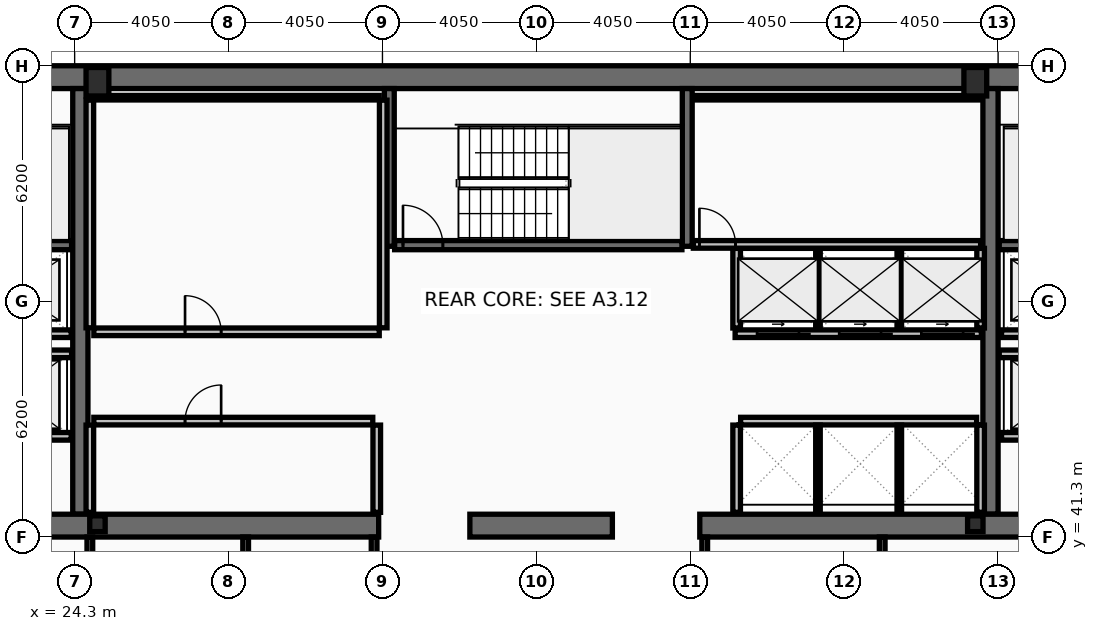
"""IFC4 building model, lengths in metres.
Left out: names, types, materials, properties, quantities, classifications, styles, units other than length and angle.
Written with IfcOpenShell. Run it as: python <this file> out.ifc"""

import sys

from ifc_helpers import new_model, si_unit, direction, frame, frame_2d, origin, origin_2d, place, context, subcontext, project, spatial, rectangle, hollow_rectangle, i_section, extrude, element, fill, save


model = new_model("IFC4")
c1 = context("Model", 3, precision=1e-05, world=origin(), true_north=direction((0.0, 1.0)))
c2 = subcontext(c1, "Body", "Model", "MODEL_VIEW")
j1 = project(units=[si_unit("LENGTHUNIT", "METRE"), si_unit("PLANEANGLEUNIT", "RADIAN")], contexts=[c1])
p1 = place(None, origin())
s1 = spatial("IfcSite", under=j1, at=p1, CompositionType="ELEMENT")
p2 = place(p1, origin())
s2 = spatial("IfcBuilding", under=s1, at=p2, CompositionType="ELEMENT")
p3 = place(p2, frame((0.0, 0.0, 199.4)))
s3 = spatial("IfcBuildingStorey", under=s2, at=p3, CompositionType="ELEMENT", Elevation=199.4)
p4 = place(p3, frame((16.2, 53.4, 0.0), z_axis=(0.0, 0.0, 1.0), x_axis=(1.0, 0.0, 0.0)))
e1 = element("IfcWall", 1, at=p4, inside=s3, PredefinedType="SHEAR", context=c2, shape_type="SweptSolid", body=[
    extrude(rectangle(XDim=40.5, YDim=0.6, at=frame_2d((20.25, 0.0))), origin(), (0.0, 0.0, 1.0), 3.44),
])
for number, where, z_axis, x_axis in (
    (2, (24.45, 41.9, 0.0), (0.0, 0.0, 1.0), (0.0, 1.0, 0.0)),
    (3, (48.4, 41.9, 0.0), (0.0, 0.0, 1.0), (0.0, 1.0, 0.0)),
):
    element("IfcWall", number, at=place(p3, frame(where, z_axis=z_axis, x_axis=x_axis)), inside=s3, PredefinedType="SHEAR", context=c2, shape_type="SweptSolid", body=[
        extrude(rectangle(XDim=11.2, YDim=0.4, at=frame_2d((5.6, 0.0))), origin(), (0.0, 0.0, 1.0), 3.44),
    ])
p5 = place(p3, frame((32.3, 41.6, 0.0), z_axis=(0.0, 0.0, 1.0), x_axis=(-1.0, 0.0, 0.0)))
e4 = element("IfcWall", 4, at=p5, inside=s3, PredefinedType="SHEAR", context=c2, shape_type="SweptSolid", body=[
    extrude(rectangle(XDim=11.45, YDim=0.6, at=frame_2d((5.725, 0.0))), origin(), (0.0, 0.0, 1.0), 3.44),
])
p6 = place(p3, frame((38.45, 41.6, 0.0), z_axis=(0.0, 0.0, 1.0), x_axis=(-1.0, 0.0, 0.0)))
e5 = element("IfcWall", 5, at=p6, inside=s3, PredefinedType="SHEAR", context=c2, shape_type="SweptSolid", body=[
    extrude(rectangle(XDim=3.75, YDim=0.6, at=frame_2d((1.875, 0.0))), origin(), (0.0, 0.0, 1.0), 3.44),
])
p7 = place(p3, frame((52.05, 41.6, 0.0), z_axis=(0.0, 0.0, 1.0), x_axis=(-1.0, 0.0, 0.0)))
e6 = element("IfcWall", 6, at=p7, inside=s3, PredefinedType="SHEAR", context=c2, shape_type="SweptSolid", body=[
    extrude(rectangle(XDim=11.3, YDim=0.6, at=frame_2d((5.65, 0.0))), origin(), (0.0, 0.0, 1.0), 3.44),
])
for number, where, z_axis, x_axis in (
    (7, (32.58, 48.95, 0.0), (0.0, 0.0, 1.0), (0.0, 1.0, 0.0)),
    (8, (40.42, 48.95, 0.0), (0.0, 0.0, 1.0), (0.0, 1.0, 0.0)),
):
    element("IfcWall", number, at=place(p3, frame(where, z_axis=z_axis, x_axis=x_axis)), inside=s3, PredefinedType="SHEAR", context=c2, shape_type="SweptSolid", body=[
        extrude(rectangle(XDim=4.15, YDim=0.26, at=frame_2d((2.075, 0.0))), origin(), (0.0, 0.0, 1.0), 3.44),
    ])
p8 = place(p3, frame((16.8, 48.98, 0.0), z_axis=(0.0, 0.0, 1.0), x_axis=(1.0, 0.0, 0.0)))
e9 = element("IfcWall", 9, at=p8, inside=s3, PredefinedType="SHEAR", context=c2, shape_type="SweptSolid", body=[
    extrude(rectangle(XDim=7.42, YDim=0.24, at=frame_2d((3.71, 0.0))), origin(), (0.0, 0.0, 1.0), 3.44),
])
p9 = place(p8, frame((0.22, 0.0, 0.0)))
e10 = element("IfcOpeningElement", 10, at=p9, cuts=e9, PredefinedType="OPENING", context=c2, shape_type="SweptSolid", body=[
    extrude(rectangle(XDim=1.05, YDim=2.15, at=frame_2d((0.525, 1.075))), frame((0.0, 0.13, 0.0), z_axis=(0.0, -1.0, 0.0), x_axis=(1.0, 0.0, 0.0)), (0.0, 0.0, 1.0), 0.26),
])
p10 = place(p3, frame((48.63, 48.98, 0.0), z_axis=(0.0, 0.0, 1.0), x_axis=(1.0, 0.0, 0.0)))
e11 = element("IfcWall", 11, at=p10, inside=s3, PredefinedType="SHEAR", context=c2, shape_type="SweptSolid", body=[
    extrude(rectangle(XDim=7.47, YDim=0.24, at=frame_2d((3.735, 0.0))), origin(), (0.0, 0.0, 1.0), 3.44),
])
p11 = place(p10, frame((6.2, 0.0, 0.0)))
e12 = element("IfcOpeningElement", 12, at=p11, cuts=e11, PredefinedType="OPENING", context=c2, shape_type="SweptSolid", body=[
    extrude(rectangle(XDim=1.05, YDim=2.15, at=frame_2d((0.525, 1.075))), frame((0.0, 0.13, 0.0), z_axis=(0.0, -1.0, 0.0), x_axis=(1.0, 0.0, 0.0)), (0.0, 0.0, 1.0), 0.26),
])
p12 = place(p3, frame((32.72, 48.98, 0.0), z_axis=(0.0, 0.0, 1.0), x_axis=(1.0, 0.0, 0.0)))
e13 = element("IfcWall", 13, at=p12, inside=s3, PredefinedType="SHEAR", context=c2, shape_type="SweptSolid", body=[
    extrude(rectangle(XDim=7.56, YDim=0.24, at=frame_2d((3.78, 0.0))), origin(), (0.0, 0.0, 1.0), 3.44),
])
p13 = place(p12, frame((0.22, 0.0, 0.0)))
e14 = element("IfcOpeningElement", 14, at=p13, cuts=e13, PredefinedType="OPENING", context=c2, shape_type="SweptSolid", body=[
    extrude(rectangle(XDim=1.05, YDim=2.15, at=frame_2d((0.525, 1.075))), frame((0.0, 0.13, 0.0), z_axis=(0.0, -1.0, 0.0), x_axis=(1.0, 0.0, 0.0)), (0.0, 0.0, 1.0), 0.26),
])
for number, where, z_axis, x_axis in (
    (15, (24.9, 53.28, 0.0), (0.0, 0.0, 1.0), (1.0, 0.0, 0.0)),
    (16, (48.0, 53.28, 0.0), (0.0, 0.0, 1.0), (1.0, 0.0, 0.0)),
):
    element("IfcColumn", number, at=place(p3, frame(where, z_axis=z_axis, x_axis=x_axis)), inside=s3, PredefinedType="COLUMN", context=c2, shape_type="SweptSolid", body=[
        extrude(hollow_rectangle(XDim=0.6, YDim=0.75, WallThickness=0.045, at=origin_2d()), origin(), (0.0, 0.0, 1.0), 3.6),
    ])
for number, where, z_axis, x_axis in (
    (17, (24.9, 41.65, 0.0), (0.0, 0.0, 1.0), (1.0, 0.0, 0.0)),
    (18, (48.0, 41.65, 0.0), (0.0, 0.0, 1.0), (1.0, 0.0, 0.0)),
):
    element("IfcColumn", number, at=place(p3, frame(where, z_axis=z_axis, x_axis=x_axis)), inside=s3, PredefinedType="COLUMN", context=c2, shape_type="SweptSolid", body=[
        extrude(i_section(OverallWidth=0.406, OverallDepth=0.416, WebThickness=0.03, FlangeThickness=0.048, at=origin_2d()), origin(), (0.0, 0.0, 1.0), 3.6),
    ])
p14 = place(p3, frame((51.61, 43.95, 0.0), z_axis=(0.0, 0.0, 1.0), x_axis=(-1.0, 0.0, 0.0)))
e19 = element("IfcWall", 19, at=p14, inside=s3, PredefinedType="PARTITIONING", context=c2, shape_type="SweptSolid", body=[
    extrude(rectangle(XDim=2.92, YDim=0.2, at=frame_2d((1.46, 0.0))), origin(), (0.0, 0.0, 1.0), 3.44),
])
p15 = place(p14, frame((0.81, 0.0, 0.0)))
e20 = element("IfcOpeningElement", 20, at=p15, cuts=e19, PredefinedType="OPENING", context=c2, shape_type="SweptSolid", body=[
    extrude(rectangle(XDim=1.3, YDim=2.18, at=frame_2d((0.65, 1.09))), frame((0.0, 0.11, 0.0), z_axis=(0.0, -1.0, 0.0), x_axis=(1.0, 0.0, 0.0)), (0.0, 0.0, 1.0), 0.22),
])
p16 = place(p3, frame((24.21, 43.95, 0.0), z_axis=(0.0, 0.0, 1.0), x_axis=(-1.0, 0.0, 0.0)))
e21 = element("IfcWall", 21, at=p16, inside=s3, PredefinedType="PARTITIONING", context=c2, shape_type="SweptSolid", body=[
    extrude(rectangle(XDim=2.97, YDim=0.2, at=frame_2d((1.485, 0.0))), origin(), (0.0, 0.0, 1.0), 3.44),
])
p17 = place(p16, frame((0.86, 0.0, 0.0)))
e22 = element("IfcOpeningElement", 22, at=p17, cuts=e21, PredefinedType="OPENING", context=c2, shape_type="SweptSolid", body=[
    extrude(rectangle(XDim=1.3, YDim=2.18, at=frame_2d((0.65, 1.09))), frame((0.0, 0.11, 0.0), z_axis=(0.0, -1.0, 0.0), x_axis=(1.0, 0.0, 0.0)), (0.0, 0.0, 1.0), 0.22),
])
p18 = place(p3, frame((51.61, 46.65, 0.0), z_axis=(0.0, 0.0, 1.0), x_axis=(-1.0, 0.0, 0.0)))
e23 = element("IfcWall", 23, at=p18, inside=s3, PredefinedType="PARTITIONING", context=c2, shape_type="SweptSolid", body=[
    extrude(rectangle(XDim=2.92, YDim=0.2, at=frame_2d((1.46, 0.0))), origin(), (0.0, 0.0, 1.0), 3.44),
])
p19 = place(p18, frame((0.86, 0.0, 0.0)))
e24 = element("IfcOpeningElement", 24, at=p19, cuts=e23, PredefinedType="OPENING", context=c2, shape_type="SweptSolid", body=[
    extrude(rectangle(XDim=1.2, YDim=2.18, at=frame_2d((0.6, 1.09))), frame((0.0, 0.11, 0.0), z_axis=(0.0, -1.0, 0.0), x_axis=(1.0, 0.0, 0.0)), (0.0, 0.0, 1.0), 0.22),
])
p20 = place(p3, frame((24.21, 46.65, 0.0), z_axis=(0.0, 0.0, 1.0), x_axis=(-1.0, 0.0, 0.0)))
e25 = element("IfcWall", 25, at=p20, inside=s3, PredefinedType="PARTITIONING", context=c2, shape_type="SweptSolid", body=[
    extrude(rectangle(XDim=2.97, YDim=0.2, at=frame_2d((1.485, 0.0))), origin(), (0.0, 0.0, 1.0), 3.44),
])
p21 = place(p20, frame((0.91, 0.0, 0.0)))
e26 = element("IfcOpeningElement", 26, at=p21, cuts=e25, PredefinedType="OPENING", context=c2, shape_type="SweptSolid", body=[
    extrude(rectangle(XDim=1.2, YDim=2.18, at=frame_2d((0.6, 1.09))), frame((0.0, 0.11, 0.0), z_axis=(0.0, -1.0, 0.0), x_axis=(1.0, 0.0, 0.0)), (0.0, 0.0, 1.0), 0.22),
])
p22 = place(p3, frame((48.16, 46.65, 0.0), z_axis=(0.0, 0.0, 1.0), x_axis=(-1.0, 0.0, 0.0)))
e27 = element("IfcWall", 27, at=p22, inside=s3, PredefinedType="PARTITIONING", context=c2, shape_type="SweptSolid", body=[
    extrude(rectangle(XDim=6.48, YDim=0.2, at=frame_2d((3.24, 0.0))), origin(), (0.0, 0.0, 1.0), 3.44),
])
p23 = place(p22, frame((4.8, 0.0, 0.0)))
e28 = element("IfcOpeningElement", 28, at=p23, cuts=e27, PredefinedType="OPENING", context=c2, shape_type="SweptSolid", body=[
    extrude(rectangle(XDim=1.1, YDim=2.18, at=frame_2d((0.55, 1.09))), frame((0.0, 0.11, 0.0), z_axis=(0.0, -1.0, 0.0), x_axis=(1.0, 0.0, 0.0)), (0.0, 0.0, 1.0), 0.22),
])
p24 = place(p22, frame((2.64, 0.0, 0.0)))
e29 = element("IfcOpeningElement", 29, at=p24, cuts=e27, PredefinedType="OPENING", context=c2, shape_type="SweptSolid", body=[
    extrude(rectangle(XDim=1.1, YDim=2.18, at=frame_2d((0.55, 1.09))), frame((0.0, 0.11, 0.0), z_axis=(0.0, -1.0, 0.0), x_axis=(1.0, 0.0, 0.0)), (0.0, 0.0, 1.0), 0.22),
])
p25 = place(p22, frame((0.48, 0.0, 0.0)))
e30 = element("IfcOpeningElement", 30, at=p25, cuts=e27, PredefinedType="OPENING", context=c2, shape_type="SweptSolid", body=[
    extrude(rectangle(XDim=1.1, YDim=2.18, at=frame_2d((0.55, 1.09))), frame((0.0, 0.11, 0.0), z_axis=(0.0, -1.0, 0.0), x_axis=(1.0, 0.0, 0.0)), (0.0, 0.0, 1.0), 0.22),
])
p26 = place(p3, frame((21.2, 46.12, 0.0), z_axis=(0.0, 0.0, 1.0), x_axis=(1.0, 0.0, 0.0)))
e31 = element("IfcWall", 31, at=p26, inside=s3, PredefinedType="PARTITIONING", context=c2, shape_type="SweptSolid", body=[
    extrude(rectangle(XDim=3.02, YDim=0.2, at=frame_2d((1.51, 0.0))), origin(), (0.0, 0.0, 1.0), 3.44),
])
p27 = place(p3, frame((48.63, 46.12, 0.0), z_axis=(0.0, 0.0, 1.0), x_axis=(1.0, 0.0, 0.0)))
e32 = element("IfcWall", 32, at=p27, inside=s3, PredefinedType="PARTITIONING", context=c2, shape_type="SweptSolid", body=[
    extrude(rectangle(XDim=3.07, YDim=0.2, at=frame_2d((1.535, 0.0))), origin(), (0.0, 0.0, 1.0), 3.44),
])
for number, where, z_axis, x_axis in (
    (33, (24.7, 46.805, 0.0), (0.0, 0.0, 1.0), (0.0, 1.0, 0.0)),
    (34, (32.42, 46.805, 0.0), (0.0, 0.0, 1.0), (0.0, 1.0, 0.0)),
):
    element("IfcWall", number, at=place(p3, frame(where, z_axis=z_axis, x_axis=x_axis)), inside=s3, PredefinedType="PARTITIONING", context=c2, shape_type="SweptSolid", body=[
        extrude(rectangle(XDim=5.99, YDim=0.2, at=frame_2d((2.995, 0.0))), origin(), (0.0, 0.0, 1.0), 3.44),
    ])
p28 = place(p3, frame((24.805, 52.86, 0.0), z_axis=(0.0, 0.0, 1.0), x_axis=(1.0, 0.0, 0.0)))
e35 = element("IfcWall", 35, at=p28, inside=s3, PredefinedType="PARTITIONING", context=c2, shape_type="SweptSolid", body=[
    extrude(rectangle(XDim=7.51, YDim=0.12, at=frame_2d((3.755, 0.0))), origin(), (0.0, 0.0, 1.0), 3.44),
])
p29 = place(p3, frame((24.805, 46.7, 0.0), z_axis=(0.0, 0.0, 1.0), x_axis=(1.0, 0.0, 0.0)))
e36 = element("IfcWall", 36, at=p29, inside=s3, PredefinedType="PARTITIONING", context=c2, shape_type="SweptSolid", body=[
    extrude(rectangle(XDim=7.51, YDim=0.2, at=frame_2d((3.755, 0.0))), origin(), (0.0, 0.0, 1.0), 3.44),
])
p30 = place(p29, frame((2.4, 0.0, 0.0)))
e37 = element("IfcOpeningElement", 37, at=p30, cuts=e36, PredefinedType="OPENING", context=c2, shape_type="SweptSolid", body=[
    extrude(rectangle(XDim=0.95, YDim=2.1, at=frame_2d((0.475, 1.05))), frame((0.0, 0.11, 0.0), z_axis=(0.0, -1.0, 0.0), x_axis=(1.0, 0.0, 0.0)), (0.0, 0.0, 1.0), 0.22),
])
for number, where, z_axis, x_axis in (
    (38, (24.7, 41.95, 0.0), (0.0, 0.0, 1.0), (0.0, 1.0, 0.0)),
    (39, (32.25, 41.95, 0.0), (0.0, 0.0, 1.0), (0.0, 1.0, 0.0)),
):
    element("IfcWall", number, at=place(p3, frame(where, z_axis=z_axis, x_axis=x_axis)), inside=s3, PredefinedType="PARTITIONING", context=c2, shape_type="SweptSolid", body=[
        extrude(rectangle(XDim=2.295, YDim=0.2, at=frame_2d((1.147, 0.0))), origin(), (0.0, 0.0, 1.0), 3.44),
    ])
p31 = place(p3, frame((24.805, 44.35, 0.0), z_axis=(0.0, 0.0, 1.0), x_axis=(1.0, 0.0, 0.0)))
e40 = element("IfcWall", 40, at=p31, inside=s3, PredefinedType="PARTITIONING", context=c2, shape_type="SweptSolid", body=[
    extrude(rectangle(XDim=7.34, YDim=0.2, at=frame_2d((3.67, 0.0))), origin(), (0.0, 0.0, 1.0), 3.44),
])
p32 = place(p31, frame((2.4, 0.0, 0.0)))
e41 = element("IfcOpeningElement", 41, at=p32, cuts=e40, PredefinedType="OPENING", context=c2, shape_type="SweptSolid", body=[
    extrude(rectangle(XDim=0.95, YDim=2.1, at=frame_2d((0.475, 1.05))), frame((0.0, 0.11, 0.0), z_axis=(0.0, -1.0, 0.0), x_axis=(1.0, 0.0, 0.0)), (0.0, 0.0, 1.0), 0.22),
])
for number, where, z_axis, x_axis in (
    (42, (41.72, 46.8, 0.0), (0.0, 0.0, 1.0), (0.0, 1.0, 0.0)),
    (43, (48.14, 46.8, 0.0), (0.0, 0.0, 1.0), (0.0, 1.0, 0.0)),
):
    element("IfcWall", number, at=place(p3, frame(where, z_axis=z_axis, x_axis=x_axis)), inside=s3, PredefinedType="PARTITIONING", context=c2, shape_type="SweptSolid", body=[
        extrude(rectangle(XDim=2.095, YDim=0.2, at=frame_2d((1.047, 0.0))), origin(), (0.0, 0.0, 1.0), 3.44),
    ])
for number, where, z_axis, x_axis in (
    (44, (43.86, 46.8, 0.0), (0.0, 0.0, 1.0), (0.0, 1.0, 0.0)),
    (45, (46.0, 46.8, 0.0), (0.0, 0.0, 1.0), (0.0, 1.0, 0.0)),
):
    element("IfcWall", number, at=place(p3, frame(where, z_axis=z_axis, x_axis=x_axis)), inside=s3, PredefinedType="PARTITIONING", context=c2, shape_type="SweptSolid", body=[
        extrude(rectangle(XDim=2.095, YDim=0.12, at=frame_2d((1.047, 0.0))), origin(), (0.0, 0.0, 1.0), 3.44),
    ])
p33 = place(p3, frame((41.825, 44.35, 0.0), z_axis=(0.0, 0.0, 1.0), x_axis=(1.0, 0.0, 0.0)))
e46 = element("IfcWall", 46, at=p33, inside=s3, PredefinedType="PARTITIONING", context=c2, shape_type="SweptSolid", body=[
    extrude(rectangle(XDim=6.21, YDim=0.2, at=frame_2d((3.105, 0.0))), origin(), (0.0, 0.0, 1.0), 3.44),
])
for number, where, z_axis, x_axis in (
    (47, (41.72, 41.95, 0.0), (0.0, 0.0, 1.0), (0.0, 1.0, 0.0)),
    (48, (48.14, 41.95, 0.0), (0.0, 0.0, 1.0), (0.0, 1.0, 0.0)),
):
    element("IfcWall", number, at=place(p3, frame(where, z_axis=z_axis, x_axis=x_axis)), inside=s3, PredefinedType="PARTITIONING", context=c2, shape_type="SweptSolid", body=[
        extrude(rectangle(XDim=2.295, YDim=0.2, at=frame_2d((1.147, 0.0))), origin(), (0.0, 0.0, 1.0), 3.44),
    ])
for number, where, z_axis, x_axis in (
    (49, (43.86, 41.95, 0.0), (0.0, 0.0, 1.0), (0.0, 1.0, 0.0)),
    (50, (46.0, 41.95, 0.0), (0.0, 0.0, 1.0), (0.0, 1.0, 0.0)),
):
    element("IfcWall", number, at=place(p3, frame(where, z_axis=z_axis, x_axis=x_axis)), inside=s3, PredefinedType="PARTITIONING", context=c2, shape_type="SweptSolid", body=[
        extrude(rectangle(XDim=2.295, YDim=0.12, at=frame_2d((1.147, 0.0))), origin(), (0.0, 0.0, 1.0), 3.44),
    ])
p34 = place(p3, frame((40.58, 52.86, 0.0), z_axis=(0.0, 0.0, 1.0), x_axis=(1.0, 0.0, 0.0)))
e51 = element("IfcWall", 51, at=p34, inside=s3, PredefinedType="PARTITIONING", context=c2, shape_type="SweptSolid", body=[
    extrude(rectangle(XDim=7.56, YDim=0.12, at=frame_2d((3.78, 0.0))), origin(), (0.0, 0.0, 1.0), 3.44),
])
p35 = place(p3, frame((40.58, 49.0, 0.0), z_axis=(0.0, 0.0, 1.0), x_axis=(1.0, 0.0, 0.0)))
e52 = element("IfcWall", 52, at=p35, inside=s3, PredefinedType="PARTITIONING", context=c2, shape_type="SweptSolid", body=[
    extrude(rectangle(XDim=7.56, YDim=0.2, at=frame_2d((3.78, 0.0))), origin(), (0.0, 0.0, 1.0), 3.44),
])
p36 = place(p35, frame((0.16, 0.0, 0.0)))
e53 = element("IfcOpeningElement", 53, at=p36, cuts=e52, PredefinedType="OPENING", context=c2, shape_type="SweptSolid", body=[
    extrude(rectangle(XDim=0.95, YDim=2.1, at=frame_2d((0.475, 1.05))), frame((0.0, 0.11, 0.0), z_axis=(0.0, -1.0, 0.0), x_axis=(1.0, 0.0, 0.0)), (0.0, 0.0, 1.0), 0.22),
])
p37 = place(p3, frame((24.7, 38.28, 0.0), z_axis=(0.0, 0.0, 1.0), x_axis=(0.0, 1.0, 0.0)))
e54 = element("IfcWall", 54, at=p37, inside=s3, PredefinedType="PARTITIONING", context=c2, shape_type="SweptSolid", body=[
    extrude(rectangle(XDim=3.02, YDim=0.15, at=frame_2d((1.51, 0.0))), origin(), (0.0, 0.0, 1.0), 2.73),
])
for number, where, z_axis, x_axis in (
    (55, (28.8, 38.28, 0.0), (0.0, 0.0, 1.0), (0.0, 1.0, 0.0)),
    (56, (32.18, 38.28, 0.0), (0.0, 0.0, 1.0), (0.0, 1.0, 0.0)),
    (57, (40.88, 38.28, 0.0), (0.0, 0.0, 1.0), (0.0, 1.0, 0.0)),
    (58, (45.55, 38.28, 0.0), (0.0, 0.0, 1.0), (0.0, 1.0, 0.0)),
):
    element("IfcWall", number, at=place(p3, frame(where, z_axis=z_axis, x_axis=x_axis)), inside=s3, PredefinedType="PARTITIONING", context=c2, shape_type="SweptSolid", body=[
        extrude(rectangle(XDim=3.02, YDim=0.15, at=frame_2d((1.51, 0.0))), origin(), (0.0, 0.0, 1.0), 3.44),
    ])
p38 = place(p13, origin())
e59 = element("IfcDoor", 59, at=p38, inside=s3, OperationType="SINGLE_SWING_LEFT", PredefinedType="DOOR", context=c2, shape_type="SweptSolid", body=[
    extrude(rectangle(XDim=1.05, YDim=2.15, at=frame_2d((0.525, 1.075))), frame((0.0, 0.025, 0.0), z_axis=(0.0, -1.0, 0.0), x_axis=(1.0, 0.0, 0.0)), (0.0, 0.0, 1.0), 0.05),
])
fill(e14, e59)
p39 = place(p23, origin())
e60 = element("IfcDoor", 60, at=p39, inside=s3, OperationType="SLIDING_TO_LEFT", PredefinedType="DOOR", context=c2, shape_type="SweptSolid", body=[
    extrude(rectangle(XDim=1.1, YDim=2.18, at=frame_2d((0.55, 1.09))), frame((0.0, 0.025, 0.0), z_axis=(0.0, -1.0, 0.0), x_axis=(1.0, 0.0, 0.0)), (0.0, 0.0, 1.0), 0.05),
])
fill(e28, e60)
p40 = place(p24, origin())
e61 = element("IfcDoor", 61, at=p40, inside=s3, OperationType="SLIDING_TO_LEFT", PredefinedType="DOOR", context=c2, shape_type="SweptSolid", body=[
    extrude(rectangle(XDim=1.1, YDim=2.18, at=frame_2d((0.55, 1.09))), frame((0.0, 0.025, 0.0), z_axis=(0.0, -1.0, 0.0), x_axis=(1.0, 0.0, 0.0)), (0.0, 0.0, 1.0), 0.05),
])
fill(e29, e61)
p41 = place(p25, origin())
e62 = element("IfcDoor", 62, at=p41, inside=s3, OperationType="SLIDING_TO_LEFT", PredefinedType="DOOR", context=c2, shape_type="SweptSolid", body=[
    extrude(rectangle(XDim=1.1, YDim=2.18, at=frame_2d((0.55, 1.09))), frame((0.0, 0.025, 0.0), z_axis=(0.0, -1.0, 0.0), x_axis=(1.0, 0.0, 0.0)), (0.0, 0.0, 1.0), 0.05),
])
fill(e30, e62)
p42 = place(p30, origin())
e63 = element("IfcDoor", 63, at=p42, inside=s3, OperationType="SINGLE_SWING_LEFT", PredefinedType="DOOR", context=c2, shape_type="SweptSolid", body=[
    extrude(rectangle(XDim=0.95, YDim=2.1, at=frame_2d((0.475, 1.05))), frame((0.0, 0.025, 0.0), z_axis=(0.0, -1.0, 0.0), x_axis=(1.0, 0.0, 0.0)), (0.0, 0.0, 1.0), 0.05),
])
fill(e37, e63)
p43 = place(p32, origin())
e64 = element("IfcDoor", 64, at=p43, inside=s3, OperationType="SINGLE_SWING_RIGHT", PredefinedType="DOOR", context=c2, shape_type="SweptSolid", body=[
    extrude(rectangle(XDim=0.95, YDim=2.1, at=frame_2d((0.475, 1.05))), frame((0.0, 0.025, 0.0), z_axis=(0.0, -1.0, 0.0), x_axis=(1.0, 0.0, 0.0)), (0.0, 0.0, 1.0), 0.05),
])
fill(e41, e64)
p44 = place(p36, origin())
e65 = element("IfcDoor", 65, at=p44, inside=s3, OperationType="SINGLE_SWING_LEFT", PredefinedType="DOOR", context=c2, shape_type="SweptSolid", body=[
    extrude(rectangle(XDim=0.95, YDim=2.1, at=frame_2d((0.475, 1.05))), frame((0.0, 0.025, 0.0), z_axis=(0.0, -1.0, 0.0), x_axis=(1.0, 0.0, 0.0)), (0.0, 0.0, 1.0), 0.05),
])
fill(e53, e65)
save(model, sys.argv[1])
